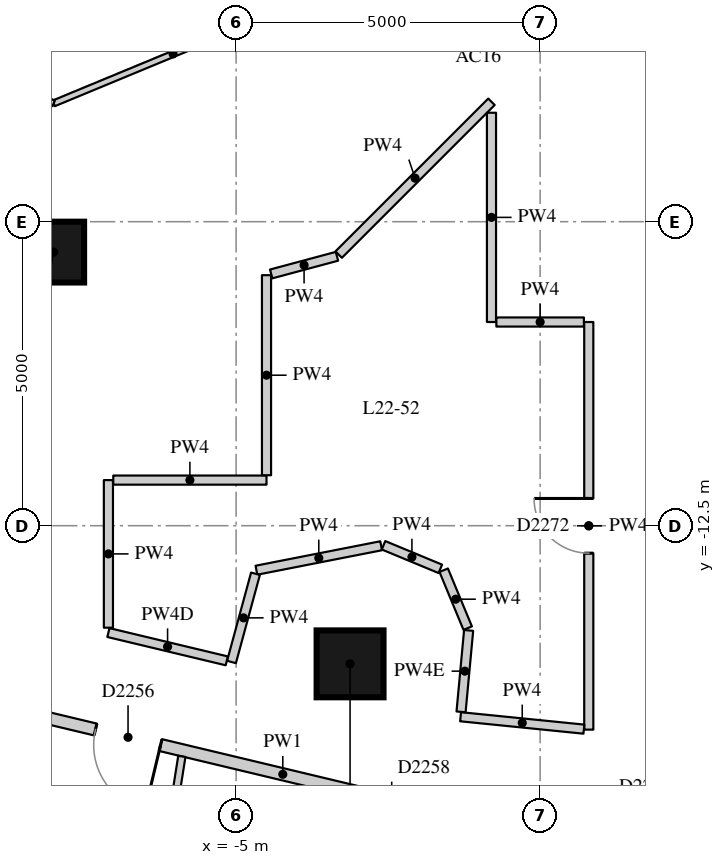
"""IFC4 building model, lengths in metres.
Left out: names, types, materials, properties, quantities, classifications, styles, units other than length and angle.
Written with IfcOpenShell. Run it as: python <this file> out.ifc"""

import sys

from ifc_helpers import new_model, si_unit, direction, frame, frame_2d, origin, origin_2d, place, context, subcontext, project, spatial, rectangle, extrude, element, fill, save


model = new_model("IFC4")
c1 = context("Model", 3, precision=1e-05, world=origin(), true_north=direction((0.0, 1.0)))
c2 = subcontext(c1, "Body", "Model", "MODEL_VIEW")
j1 = project(units=[si_unit("LENGTHUNIT", "METRE"), si_unit("PLANEANGLEUNIT", "RADIAN")], contexts=[c1])
p1 = place(None, origin())
s1 = spatial("IfcSite", under=j1, at=p1, CompositionType="ELEMENT")
p2 = place(p1, origin())
s2 = spatial("IfcBuilding", under=s1, at=p2, CompositionType="ELEMENT")
p3 = place(p2, frame((0.0, 0.0, 81.1)))
s3 = spatial("IfcBuildingStorey", under=s2, at=p3, CompositionType="ELEMENT", Elevation=81.1)
p4 = place(p3, frame((-8.0, -8.0, 0.0), z_axis=(0.0, 0.0, 1.0), x_axis=(1.0, 0.0, 0.0)))
e1 = element("IfcColumn", 1, at=p4, inside=s3, PredefinedType="COLUMN", context=c2, shape_type="SweptSolid", body=[
    extrude(rectangle(XDim=1.0, YDim=1.0, at=origin_2d()), origin(), (0.0, 0.0, 1.0), 3.3),
])
p5 = place(p3, frame((-3.126, -14.772, 0.0), z_axis=(0.0, 0.0, 1.0), x_axis=(1.0, 0.0, 0.0)))
e2 = element("IfcColumn", 2, at=p5, inside=s3, PredefinedType="COLUMN", context=c2, shape_type="SweptSolid", body=[
    extrude(rectangle(XDim=1.1, YDim=1.1, at=origin_2d()), origin(), (0.0, 0.0, 1.0), 3.3),
])
p6 = place(p3, frame((7.273, -16.453, 0.0), z_axis=(0.0, 0.0, 1.0), x_axis=(-0.987787686426, -0.155805925901, 0.0)))
e3 = element("IfcWall", 3, at=p6, inside=s3, PredefinedType="PARTITIONING", context=c2, shape_type="SweptSolid", body=[
    extrude(rectangle(XDim=7.363, YDim=0.2, at=frame_2d((3.682, 0.0))), origin(), (0.0, 0.0, 1.0), 2.85),
])
p7 = place(p6, frame((5.161, 0.0, 0.0)))
e4 = element("IfcOpeningElement", 4, at=p7, cuts=e3, PredefinedType="OPENING", context=c2, shape_type="SweptSolid", body=[
    extrude(rectangle(XDim=0.9, YDim=2.1, at=frame_2d((0.45, 1.05))), frame((0.0, 0.11, 0.0), z_axis=(0.0, -1.0, 0.0), x_axis=(1.0, 0.0, 0.0)), (0.0, 0.0, 1.0), 0.22),
])
p8 = place(p6, frame((1.957, 0.0, 0.0)))
e5 = element("IfcOpeningElement", 5, at=p8, cuts=e3, PredefinedType="OPENING", context=c2, shape_type="SweptSolid", body=[
    extrude(rectangle(XDim=1.0, YDim=2.1, at=frame_2d((0.5, 1.05))), frame((0.0, 0.11, 0.0), z_axis=(0.0, -1.0, 0.0), x_axis=(1.0, 0.0, 0.0)), (0.0, 0.0, 1.0), 0.22),
])
p9 = place(p3, frame((-0.098, -17.577, 0.0), z_axis=(0.0, 0.0, 1.0), x_axis=(-0.972591034443, 0.232522428425, 0.0)))
e6 = element("IfcWall", 6, at=p9, inside=s3, PredefinedType="PARTITIONING", context=c2, shape_type="SweptSolid", body=[
    extrude(rectangle(XDim=8.501, YDim=0.2, at=frame_2d((4.251, 0.0))), origin(), (0.0, 0.0, 1.0), 2.85),
])
p10 = place(p9, frame((6.318, 0.0, 0.0)))
e7 = element("IfcOpeningElement", 7, at=p10, cuts=e6, PredefinedType="OPENING", context=c2, shape_type="SweptSolid", body=[
    extrude(rectangle(XDim=1.1, YDim=2.1, at=frame_2d((0.55, 1.05))), frame((0.0, 0.11, 0.0), z_axis=(0.0, -1.0, 0.0), x_axis=(1.0, 0.0, 0.0)), (0.0, 0.0, 1.0), 0.22),
])
p11 = place(p9, frame((1.909, 0.0, 0.0)))
e8 = element("IfcOpeningElement", 8, at=p11, cuts=e6, PredefinedType="OPENING", context=c2, shape_type="SweptSolid", body=[
    extrude(rectangle(XDim=1.0, YDim=2.1, at=frame_2d((0.5, 1.05))), frame((0.0, 0.11, 0.0), z_axis=(0.0, -1.0, 0.0), x_axis=(1.0, 0.0, 0.0)), (0.0, 0.0, 1.0), 0.22),
])
p12 = place(p3, frame((0.8, -9.15, 0.0), z_axis=(0.0, 0.0, 1.0), x_axis=(0.0, -1.0, 0.0)))
e9 = element("IfcWall", 9, at=p12, inside=s3, PredefinedType="PARTITIONING", context=c2, shape_type="SweptSolid", body=[
    extrude(rectangle(XDim=6.704, YDim=0.15, at=frame_2d((3.352, 0.0))), origin(), (0.0, 0.0, 1.0), 2.3),
])
p13 = place(p12, frame((2.902, 0.0, 0.0)))
e10 = element("IfcOpeningElement", 10, at=p13, cuts=e9, PredefinedType="OPENING", context=c2, shape_type="SweptSolid", body=[
    extrude(rectangle(XDim=0.9, YDim=2.1, at=frame_2d((0.45, 1.05))), frame((0.0, 0.085, 0.0), z_axis=(0.0, -1.0, 0.0), x_axis=(1.0, 0.0, 0.0)), (0.0, 0.0, 1.0), 0.17),
])
p14 = place(p3, frame((0.72, -15.846, 0.0), z_axis=(0.0, 0.0, 1.0), x_axis=(-0.994975339981, 0.100120291794, 0.0)))
e11 = element("IfcWall", 11, at=p14, inside=s3, PredefinedType="PARTITIONING", context=c2, shape_type="SweptSolid", body=[
    extrude(rectangle(XDim=2.039, YDim=0.15, at=frame_2d((1.019, 0.0))), origin(), (0.0, 0.0, 1.0), 2.85),
])
p15 = place(p3, frame((-1.301, -15.562, 0.0), z_axis=(0.0, 0.0, 1.0), x_axis=(0.092711214224, 0.995693040428, 0.0)))
e12 = element("IfcWall", 12, at=p15, inside=s3, PredefinedType="PARTITIONING", context=c2, shape_type="SweptSolid", body=[
    extrude(rectangle(XDim=1.346, YDim=0.15, at=frame_2d((0.673, 0.0))), origin(), (0.0, 0.0, 1.0), 2.3),
])
p16 = place(p3, frame((-1.191, -14.185, 0.0), z_axis=(0.0, 0.0, 1.0), x_axis=(-0.382748986126, 0.92385237653, 0.0)))
e13 = element("IfcWall", 13, at=p16, inside=s3, PredefinedType="PARTITIONING", context=c2, shape_type="SweptSolid", body=[
    extrude(rectangle(XDim=1.031, YDim=0.15, at=frame_2d((0.516, 0.0))), origin(), (0.0, 0.0, 1.0), 2.85),
])
p17 = place(p3, frame((-1.641, -13.209, 0.0), z_axis=(0.0, 0.0, 1.0), x_axis=(-0.923725449546, 0.383055209937, 0.0)))
e14 = element("IfcWall", 14, at=p17, inside=s3, PredefinedType="PARTITIONING", context=c2, shape_type="SweptSolid", body=[
    extrude(rectangle(XDim=1.011, YDim=0.15, at=frame_2d((0.506, 0.0))), origin(), (0.0, 0.0, 1.0), 2.85),
])
p18 = place(p3, frame((-2.615, -12.83, 0.0), z_axis=(0.0, 0.0, 1.0), x_axis=(-0.981297312652, -0.192498270593, 0.0)))
e15 = element("IfcWall", 15, at=p18, inside=s3, PredefinedType="PARTITIONING", context=c2, shape_type="SweptSolid", body=[
    extrude(rectangle(XDim=2.09, YDim=0.15, at=frame_2d((1.045, 0.0))), origin(), (0.0, 0.0, 1.0), 2.85),
])
p19 = place(p3, frame((-4.681, -13.29, 0.0), z_axis=(0.0, 0.0, 1.0), x_axis=(-0.26230696824, -0.964984484027, 0.0)))
e16 = element("IfcWall", 16, at=p19, inside=s3, PredefinedType="PARTITIONING", context=c2, shape_type="SweptSolid", body=[
    extrude(rectangle(XDim=1.504, YDim=0.15, at=frame_2d((0.752, 0.0))), origin(), (0.0, 0.0, 1.0), 2.85),
])
p20 = place(p3, frame((-5.154, -14.723, 0.0), z_axis=(0.0, 0.0, 1.0), x_axis=(-0.97258848944, 0.232533073366, 0.0)))
e17 = element("IfcWall", 17, at=p20, inside=s3, PredefinedType="PARTITIONING", context=c2, shape_type="SweptSolid", body=[
    extrude(rectangle(XDim=2.001, YDim=0.15, at=frame_2d((1.0, 0.0))), origin(), (0.0, 0.0, 1.0), 2.4),
])
p21 = place(p3, frame((-7.1, -14.177, 0.0), z_axis=(0.0, 0.0, 1.0), x_axis=(0.0, 1.0, 0.0)))
e18 = element("IfcWall", 18, at=p21, inside=s3, PredefinedType="PARTITIONING", context=c2, shape_type="SweptSolid", body=[
    extrude(rectangle(XDim=2.427, YDim=0.15, at=frame_2d((1.214, 0.0))), origin(), (0.0, 0.0, 1.0), 2.85),
])
p22 = place(p3, frame((-7.02, -11.75, 0.0), z_axis=(0.0, 0.0, 1.0), x_axis=(1.0, 0.0, 0.0)))
e19 = element("IfcWall", 19, at=p22, inside=s3, PredefinedType="PARTITIONING", context=c2, shape_type="SweptSolid", body=[
    extrude(rectangle(XDim=2.52, YDim=0.15, at=frame_2d((1.26, 0.0))), origin(), (0.0, 0.0, 1.0), 2.85),
])
p23 = place(p3, frame((-4.5, -11.67, 0.0), z_axis=(0.0, 0.0, 1.0), x_axis=(0.0, 1.0, 0.0)))
e20 = element("IfcWall", 20, at=p23, inside=s3, PredefinedType="PARTITIONING", context=c2, shape_type="SweptSolid", body=[
    extrude(rectangle(XDim=3.29, YDim=0.15, at=frame_2d((1.645, 0.0))), origin(), (0.0, 0.0, 1.0), 2.85),
])
p24 = place(p3, frame((-4.423, -8.359, 0.0), z_axis=(0.0, 0.0, 1.0), x_axis=(0.965872111433, 0.259019428529, 0.0)))
e21 = element("IfcWall", 21, at=p24, inside=s3, PredefinedType="PARTITIONING", context=c2, shape_type="SweptSolid", body=[
    extrude(rectangle(XDim=1.12, YDim=0.15, at=frame_2d((0.56, 0.0))), origin(), (0.0, 0.0, 1.0), 2.85),
])
p25 = place(p3, frame((-3.313, -8.041, 0.0), z_axis=(0.0, 0.0, 1.0), x_axis=(0.707106781187, 0.707106781187, 0.0)))
e22 = element("IfcWall", 22, at=p25, inside=s3, PredefinedType="PARTITIONING", context=c2, shape_type="SweptSolid", body=[
    extrude(rectangle(XDim=3.554, YDim=0.15, at=frame_2d((1.777, 0.0))), origin(), (0.0, 0.0, 1.0), 2.85),
])
p26 = place(p3, frame((-0.8, -5.708, 0.0), z_axis=(0.0, 0.0, 1.0), x_axis=(0.0, -1.0, 0.0)))
e23 = element("IfcWall", 23, at=p26, inside=s3, PredefinedType="PARTITIONING", context=c2, shape_type="SweptSolid", body=[
    extrude(rectangle(XDim=3.442, YDim=0.15, at=frame_2d((1.721, 0.0))), origin(), (0.0, 0.0, 1.0), 2.85),
])
p27 = place(p3, frame((-0.72, -9.15, 0.0), z_axis=(0.0, 0.0, 1.0), x_axis=(1.0, 0.0, 0.0)))
e24 = element("IfcWall", 24, at=p27, inside=s3, PredefinedType="PARTITIONING", context=c2, shape_type="SweptSolid", body=[
    extrude(rectangle(XDim=1.44, YDim=0.15, at=frame_2d((0.72, 0.0))), origin(), (0.0, 0.0, 1.0), 2.85),
])
p28 = place(p3, frame((-5.892, -16.294, 0.0), z_axis=(0.0, 0.0, 1.0), x_axis=(-0.156190565974, -0.987726939544, 0.0)))
e25 = element("IfcWall", 25, at=p28, inside=s3, PredefinedType="PARTITIONING", context=c2, shape_type="SweptSolid", body=[
    extrude(rectangle(XDim=3.079, YDim=0.12, at=frame_2d((1.54, 0.0))), origin(), (0.0, 0.0, 1.0), 2.85),
])
for number, where, z_axis, x_axis in (
    (26, (-4.073, -3.927, 0.0), (0.0, 0.0, 1.0), (-0.924, -0.383, 0.0)),
    (27, (-8.0, -5.554, 0.0), (0.0, 0.0, 1.0), (-0.924, 0.383, 0.0)),
):
    element("IfcWall", number, at=place(p3, frame(where, z_axis=z_axis, x_axis=x_axis)), inside=s3, PredefinedType="PARTITIONING", context=c2, shape_type="SweptSolid", body=[
        extrude(rectangle(XDim=4.251, YDim=0.1, at=frame_2d((2.125, 0.0))), origin(), (0.0, 0.0, 1.0), 2.85),
    ])
p29 = place(p10, origin())
e28 = element("IfcDoor", 28, at=p29, inside=s3, OperationType="SINGLE_SWING_LEFT", PredefinedType="DOOR", context=c2, shape_type="SweptSolid", body=[
    extrude(rectangle(XDim=1.1, YDim=2.1, at=frame_2d((0.55, 1.05))), frame((0.0, 0.025, 0.0), z_axis=(0.0, -1.0, 0.0), x_axis=(1.0, 0.0, 0.0)), (0.0, 0.0, 1.0), 0.05),
])
fill(e7, e28)
p30 = place(p13, origin())
e29 = element("IfcDoor", 29, at=p30, inside=s3, OperationType="SINGLE_SWING_RIGHT", PredefinedType="DOOR", context=c2, shape_type="SweptSolid", body=[
    extrude(rectangle(XDim=0.9, YDim=2.1, at=frame_2d((0.45, 1.05))), frame((0.0, 0.025, 0.0), z_axis=(0.0, -1.0, 0.0), x_axis=(1.0, 0.0, 0.0)), (0.0, 0.0, 1.0), 0.05),
])
fill(e10, e29)
save(model, sys.argv[1])
